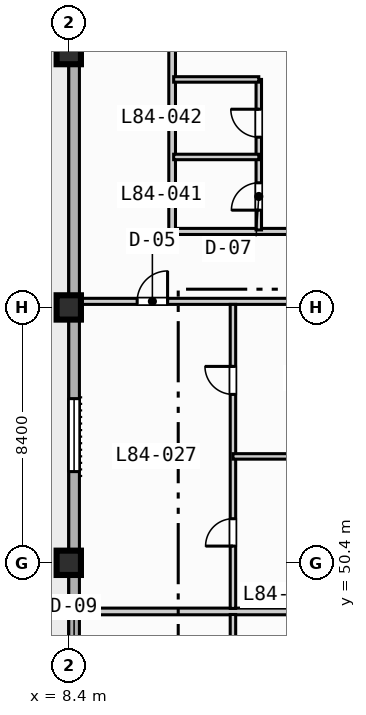
"""IFC4 building model, lengths in metres.
Left out: names, types, materials, properties, quantities, classifications, styles, units other than length and angle.
Written with IfcOpenShell. Run it as: python <this file> out.ifc"""

import sys

from ifc_helpers import new_model, si_unit, direction, frame, frame_2d, origin, origin_2d, place, context, subcontext, project, spatial, rectangle, extrude, element, fill, save


model = new_model("IFC4")
c1 = context("Model", 3, precision=1e-05, world=origin(), true_north=direction((0.0, 1.0)))
c2 = subcontext(c1, "Body", "Model", "MODEL_VIEW")
j1 = project(units=[si_unit("LENGTHUNIT", "METRE"), si_unit("PLANEANGLEUNIT", "RADIAN")], contexts=[c1])
p1 = place(None, origin())
s1 = spatial("IfcSite", under=j1, at=p1, CompositionType="ELEMENT")
p2 = place(p1, origin())
s2 = spatial("IfcBuilding", under=s1, at=p2, CompositionType="ELEMENT")
p3 = place(p2, frame((0.0, 0.0, 339.8)))
s3 = spatial("IfcBuildingStorey", under=s2, at=p3, CompositionType="ELEMENT", Elevation=339.8)
for number, where, z_axis, x_axis in (
    (1, (8.4, 50.4, 0.0), (0.0, 0.0, 1.0), (1.0, 0.0, 0.0)),
    (2, (8.4, 58.8, 0.0), (0.0, 0.0, 1.0), (1.0, 0.0, 0.0)),
    (3, (8.4, 67.2, 0.0), (0.0, 0.0, 1.0), (1.0, 0.0, 0.0)),
):
    element("IfcColumn", number, at=place(p3, frame(where, z_axis=z_axis, x_axis=x_axis)), inside=s3, PredefinedType="COLUMN", context=c2, shape_type="SweptSolid", body=[
        extrude(rectangle(XDim=0.8, YDim=0.8, at=origin_2d()), origin(), (0.0, 0.0, 1.0), 3.9),
    ])
p4 = place(p3, frame((8.575, 11.575, 0.0), z_axis=(0.0, 0.0, 1.0), x_axis=(0.0, 1.0, 0.0)))
e4 = element("IfcWall", 4, at=p4, inside=s3, PredefinedType="STANDARD", context=c2, shape_type="SweptSolid", body=[
    extrude(rectangle(XDim=60.85, YDim=0.35, at=frame_2d((30.425, 0.0))), origin(), (0.0, 0.0, 1.0), 3.67),
])
p5 = place(p4, frame((33.925, 0.0, 0.0)))
e5 = element("IfcOpeningElement", 5, at=p5, cuts=e4, PredefinedType="OPENING", context=c2, shape_type="SweptSolid", body=[
    extrude(rectangle(XDim=1.4, YDim=2.2, at=frame_2d((0.7, 1.1))), frame((0.0, 0.185, 0.0), z_axis=(0.0, -1.0, 0.0), x_axis=(1.0, 0.0, 0.0)), (0.0, 0.0, 1.0), 0.37),
])
p6 = place(p4, frame((25.025, 0.0, 0.85)))
e6 = element("IfcOpeningElement", 6, at=p6, cuts=e4, PredefinedType="OPENING", context=c2, shape_type="SweptSolid", body=[
    extrude(rectangle(XDim=2.4, YDim=1.95, at=frame_2d((1.2, 0.975))), frame((0.0, 0.185, 0.0), z_axis=(0.0, -1.0, 0.0), x_axis=(1.0, 0.0, 0.0)), (0.0, 0.0, 1.0), 0.37),
])
p7 = place(p4, frame((41.825, 0.0, 0.85)))
e7 = element("IfcOpeningElement", 7, at=p7, cuts=e4, PredefinedType="OPENING", context=c2, shape_type="SweptSolid", body=[
    extrude(rectangle(XDim=2.4, YDim=1.95, at=frame_2d((1.2, 0.975))), frame((0.0, 0.185, 0.0), z_axis=(0.0, -1.0, 0.0), x_axis=(1.0, 0.0, 0.0)), (0.0, 0.0, 1.0), 0.37),
])
p8 = place(p4, frame((19.25, 0.0, 0.85)))
e8 = element("IfcOpeningElement", 8, at=p8, cuts=e4, PredefinedType="OPENING", context=c2, shape_type="SweptSolid", body=[
    extrude(rectangle(XDim=1.8, YDim=1.8, at=frame_2d((0.9, 0.9))), frame((0.0, 0.185, 0.0), z_axis=(0.0, -1.0, 0.0), x_axis=(1.0, 0.0, 0.0)), (0.0, 0.0, 1.0), 0.37),
])
p9 = place(p3, frame((8.65, 59.0, 0.0), z_axis=(0.0, 0.0, 1.0), x_axis=(1.0, 0.0, 0.0)))
e9 = element("IfcWall", 9, at=p9, inside=s3, PredefinedType="PARTITIONING", context=c2, shape_type="SweptSolid", body=[
    extrude(rectangle(XDim=7.95, YDim=0.2, at=frame_2d((3.975, 0.0))), origin(), (0.0, 0.0, 1.0), 3.07),
])
p10 = place(p9, frame((2.0, 0.0, 0.0)))
e10 = element("IfcOpeningElement", 10, at=p10, cuts=e9, PredefinedType="OPENING", context=c2, shape_type="SweptSolid", body=[
    extrude(rectangle(XDim=1.0, YDim=2.15, at=frame_2d((0.5, 1.075))), frame((0.0, 0.11, 0.0), z_axis=(0.0, -1.0, 0.0), x_axis=(1.0, 0.0, 0.0)), (0.0, 0.0, 1.0), 0.22),
])
p11 = place(p3, frame((8.65, 48.8, 0.0), z_axis=(0.0, 0.0, 1.0), x_axis=(1.0, 0.0, 0.0)))
e11 = element("IfcWall", 11, at=p11, inside=s3, PredefinedType="PARTITIONING", context=c2, shape_type="SweptSolid", body=[
    extrude(rectangle(XDim=7.95, YDim=0.22, at=frame_2d((3.975, 0.0))), origin(), (0.0, 0.0, 1.0), 3.67),
])
p12 = place(p3, frame((13.8, 41.7, 0.0), z_axis=(0.0, 0.0, 1.0), x_axis=(0.0, 1.0, 0.0)))
e12 = element("IfcWall", 12, at=p12, inside=s3, PredefinedType="PLUMBINGWALL", context=c2, shape_type="SweptSolid", body=[
    extrude(rectangle(XDim=7.0, YDim=0.18, at=frame_2d((3.5, 0.0))), origin(), (0.0, 0.0, 1.0), 3.67),
])
p13 = place(p12, frame((1.3, 0.0, 0.0)))
e13 = element("IfcOpeningElement", 13, at=p13, cuts=e12, PredefinedType="OPENING", context=c2, shape_type="SweptSolid", body=[
    extrude(rectangle(XDim=0.9, YDim=2.1, at=frame_2d((0.45, 1.05))), frame((0.0, 0.1, 0.0), z_axis=(0.0, -1.0, 0.0), x_axis=(1.0, 0.0, 0.0)), (0.0, 0.0, 1.0), 0.2),
])
p14 = place(p12, frame((4.79, 0.0, 0.0)))
e14 = element("IfcOpeningElement", 14, at=p14, cuts=e12, PredefinedType="OPENING", context=c2, shape_type="SweptSolid", body=[
    extrude(rectangle(XDim=0.92, YDim=2.1, at=frame_2d((0.46, 1.05))), frame((0.0, 0.1, 0.0), z_axis=(0.0, -1.0, 0.0), x_axis=(1.0, 0.0, 0.0)), (0.0, 0.0, 1.0), 0.2),
])
p15 = place(p3, frame((13.8, 48.9, 0.0), z_axis=(0.0, 0.0, 1.0), x_axis=(0.0, 1.0, 0.0)))
e15 = element("IfcWall", 15, at=p15, inside=s3, PredefinedType="PLUMBINGWALL", context=c2, shape_type="SweptSolid", body=[
    extrude(rectangle(XDim=10.0, YDim=0.18, at=frame_2d((5.0, 0.0))), origin(), (0.0, 0.0, 1.0), 3.67),
])
p16 = place(p15, frame((2.05, 0.0, 0.0)))
e16 = element("IfcOpeningElement", 16, at=p16, cuts=e15, PredefinedType="OPENING", context=c2, shape_type="SweptSolid", body=[
    extrude(rectangle(XDim=0.9, YDim=2.1, at=frame_2d((0.45, 1.05))), frame((0.0, 0.1, 0.0), z_axis=(0.0, -1.0, 0.0), x_axis=(1.0, 0.0, 0.0)), (0.0, 0.0, 1.0), 0.2),
])
p17 = place(p15, frame((7.04, 0.0, 0.0)))
e17 = element("IfcOpeningElement", 17, at=p17, cuts=e15, PredefinedType="OPENING", context=c2, shape_type="SweptSolid", body=[
    extrude(rectangle(XDim=0.92, YDim=2.1, at=frame_2d((0.46, 1.05))), frame((0.0, 0.1, 0.0), z_axis=(0.0, -1.0, 0.0), x_axis=(1.0, 0.0, 0.0)), (0.0, 0.0, 1.0), 0.2),
])
p18 = place(p3, frame((13.8, 53.9, 0.0), z_axis=(0.0, 0.0, 1.0), x_axis=(1.0, 0.0, 0.0)))
e18 = element("IfcWall", 18, at=p18, inside=s3, PredefinedType="PLUMBINGWALL", context=c2, shape_type="SweptSolid", body=[
    extrude(rectangle(XDim=2.8, YDim=0.18, at=frame_2d((1.4, 0.0))), origin(), (0.0, 0.0, 1.0), 3.67),
])
p19 = place(p3, frame((11.8, 61.3, 0.0), z_axis=(0.0, 0.0, 1.0), x_axis=(1.0, 0.0, 0.0)))
e19 = element("IfcWall", 19, at=p19, inside=s3, PredefinedType="PARTITIONING", context=c2, shape_type="SweptSolid", body=[
    extrude(rectangle(XDim=21.35, YDim=0.2, at=frame_2d((10.675, 0.0))), origin(), (0.0, 0.0, 1.0), 3.67),
])
p20 = place(p19, frame((4.05, 0.0, 0.0)))
e20 = element("IfcOpeningElement", 20, at=p20, cuts=e19, PredefinedType="OPENING", context=c2, shape_type="SweptSolid", body=[
    extrude(rectangle(XDim=1.0, YDim=2.15, at=frame_2d((0.5, 1.075))), frame((0.0, 0.11, 0.0), z_axis=(0.0, -1.0, 0.0), x_axis=(1.0, 0.0, 0.0)), (0.0, 0.0, 1.0), 0.22),
])
p21 = place(p3, frame((11.8, 61.3, 0.0), z_axis=(0.0, 0.0, 1.0), x_axis=(0.0, 1.0, 0.0)))
e21 = element("IfcWall", 21, at=p21, inside=s3, PredefinedType="PARTITIONING", context=c2, shape_type="SweptSolid", body=[
    extrude(rectangle(XDim=11.1, YDim=0.22, at=frame_2d((5.55, 0.0))), origin(), (0.0, 0.0, 1.0), 3.67),
])
p22 = place(p3, frame((14.65, 61.35, 0.0), z_axis=(0.0, 0.0, 1.0), x_axis=(0.0, 1.0, 0.0)))
e22 = element("IfcWall", 22, at=p22, inside=s3, PredefinedType="PLUMBINGWALL", context=c2, shape_type="SweptSolid", body=[
    extrude(rectangle(XDim=4.95, YDim=0.18, at=frame_2d((2.475, 0.0))), origin(), (0.0, 0.0, 1.0), 3.67),
])
p23 = place(p22, frame((0.65, 0.0, 0.0)))
e23 = element("IfcOpeningElement", 23, at=p23, cuts=e22, PredefinedType="OPENING", context=c2, shape_type="SweptSolid", body=[
    extrude(rectangle(XDim=0.9, YDim=2.1, at=frame_2d((0.45, 1.05))), frame((0.0, 0.1, 0.0), z_axis=(0.0, -1.0, 0.0), x_axis=(1.0, 0.0, 0.0)), (0.0, 0.0, 1.0), 0.2),
])
p24 = place(p22, frame((3.05, 0.0, 0.0)))
e24 = element("IfcOpeningElement", 24, at=p24, cuts=e22, PredefinedType="OPENING", context=c2, shape_type="SweptSolid", body=[
    extrude(rectangle(XDim=0.92, YDim=2.1, at=frame_2d((0.46, 1.05))), frame((0.0, 0.1, 0.0), z_axis=(0.0, -1.0, 0.0), x_axis=(1.0, 0.0, 0.0)), (0.0, 0.0, 1.0), 0.2),
])
for number, where, z_axis, x_axis in (
    (25, (11.85, 63.75, 0.0), (0.0, 0.0, 1.0), (1.0, 0.0, 0.0)),
    (26, (11.85, 66.3, 0.0), (0.0, 0.0, 1.0), (1.0, 0.0, 0.0)),
):
    element("IfcWall", number, at=place(p3, frame(where, z_axis=z_axis, x_axis=x_axis)), inside=s3, PredefinedType="PLUMBINGWALL", context=c2, shape_type="SweptSolid", body=[
        extrude(rectangle(XDim=2.8, YDim=0.18, at=frame_2d((1.4, 0.0))), origin(), (0.0, 0.0, 1.0), 3.67),
    ])
p25 = place(p7, origin())
e27 = element("IfcWindow", 27, at=p25, inside=s3, PartitioningType="SINGLE_PANEL", PredefinedType="WINDOW", context=c2, shape_type="SweptSolid", body=[
    extrude(rectangle(XDim=2.4, YDim=1.95, at=frame_2d((1.2, 0.975))), frame((0.0, 0.03, 0.0), z_axis=(0.0, -1.0, 0.0), x_axis=(1.0, 0.0, 0.0)), (0.0, 0.0, 1.0), 0.06),
])
fill(e7, e27)
p26 = place(p10, origin())
e28 = element("IfcDoor", 28, at=p26, inside=s3, OperationType="SINGLE_SWING_RIGHT", PredefinedType="DOOR", context=c2, shape_type="SweptSolid", body=[
    extrude(rectangle(XDim=1.0, YDim=2.15, at=frame_2d((0.5, 1.075))), frame((0.0, 0.025, 0.0), z_axis=(0.0, -1.0, 0.0), x_axis=(1.0, 0.0, 0.0)), (0.0, 0.0, 1.0), 0.05),
])
fill(e10, e28)
p27 = place(p16, origin())
e29 = element("IfcDoor", 29, at=p27, inside=s3, OperationType="SINGLE_SWING_LEFT", PredefinedType="DOOR", context=c2, shape_type="SweptSolid", body=[
    extrude(rectangle(XDim=0.9, YDim=2.1, at=frame_2d((0.45, 1.05))), frame((0.0, 0.025, 0.0), z_axis=(0.0, -1.0, 0.0), x_axis=(1.0, 0.0, 0.0)), (0.0, 0.0, 1.0), 0.05),
])
fill(e16, e29)
p28 = place(p17, origin())
e30 = element("IfcDoor", 30, at=p28, inside=s3, OperationType="SINGLE_SWING_RIGHT", PredefinedType="DOOR", context=c2, shape_type="SweptSolid", body=[
    extrude(rectangle(XDim=0.92, YDim=2.1, at=frame_2d((0.46, 1.05))), frame((0.0, 0.025, 0.0), z_axis=(0.0, -1.0, 0.0), x_axis=(1.0, 0.0, 0.0)), (0.0, 0.0, 1.0), 0.05),
])
fill(e17, e30)
p29 = place(p23, origin())
e31 = element("IfcDoor", 31, at=p29, inside=s3, OperationType="SINGLE_SWING_LEFT", PredefinedType="DOOR", context=c2, shape_type="SweptSolid", body=[
    extrude(rectangle(XDim=0.9, YDim=2.1, at=frame_2d((0.45, 1.05))), frame((0.0, 0.025, 0.0), z_axis=(0.0, -1.0, 0.0), x_axis=(1.0, 0.0, 0.0)), (0.0, 0.0, 1.0), 0.05),
])
fill(e23, e31)
p30 = place(p24, origin())
e32 = element("IfcDoor", 32, at=p30, inside=s3, OperationType="SINGLE_SWING_RIGHT", PredefinedType="DOOR", context=c2, shape_type="SweptSolid", body=[
    extrude(rectangle(XDim=0.92, YDim=2.1, at=frame_2d((0.46, 1.05))), frame((0.0, 0.025, 0.0), z_axis=(0.0, -1.0, 0.0), x_axis=(1.0, 0.0, 0.0)), (0.0, 0.0, 1.0), 0.05),
])
fill(e24, e32)
save(model, sys.argv[1])
